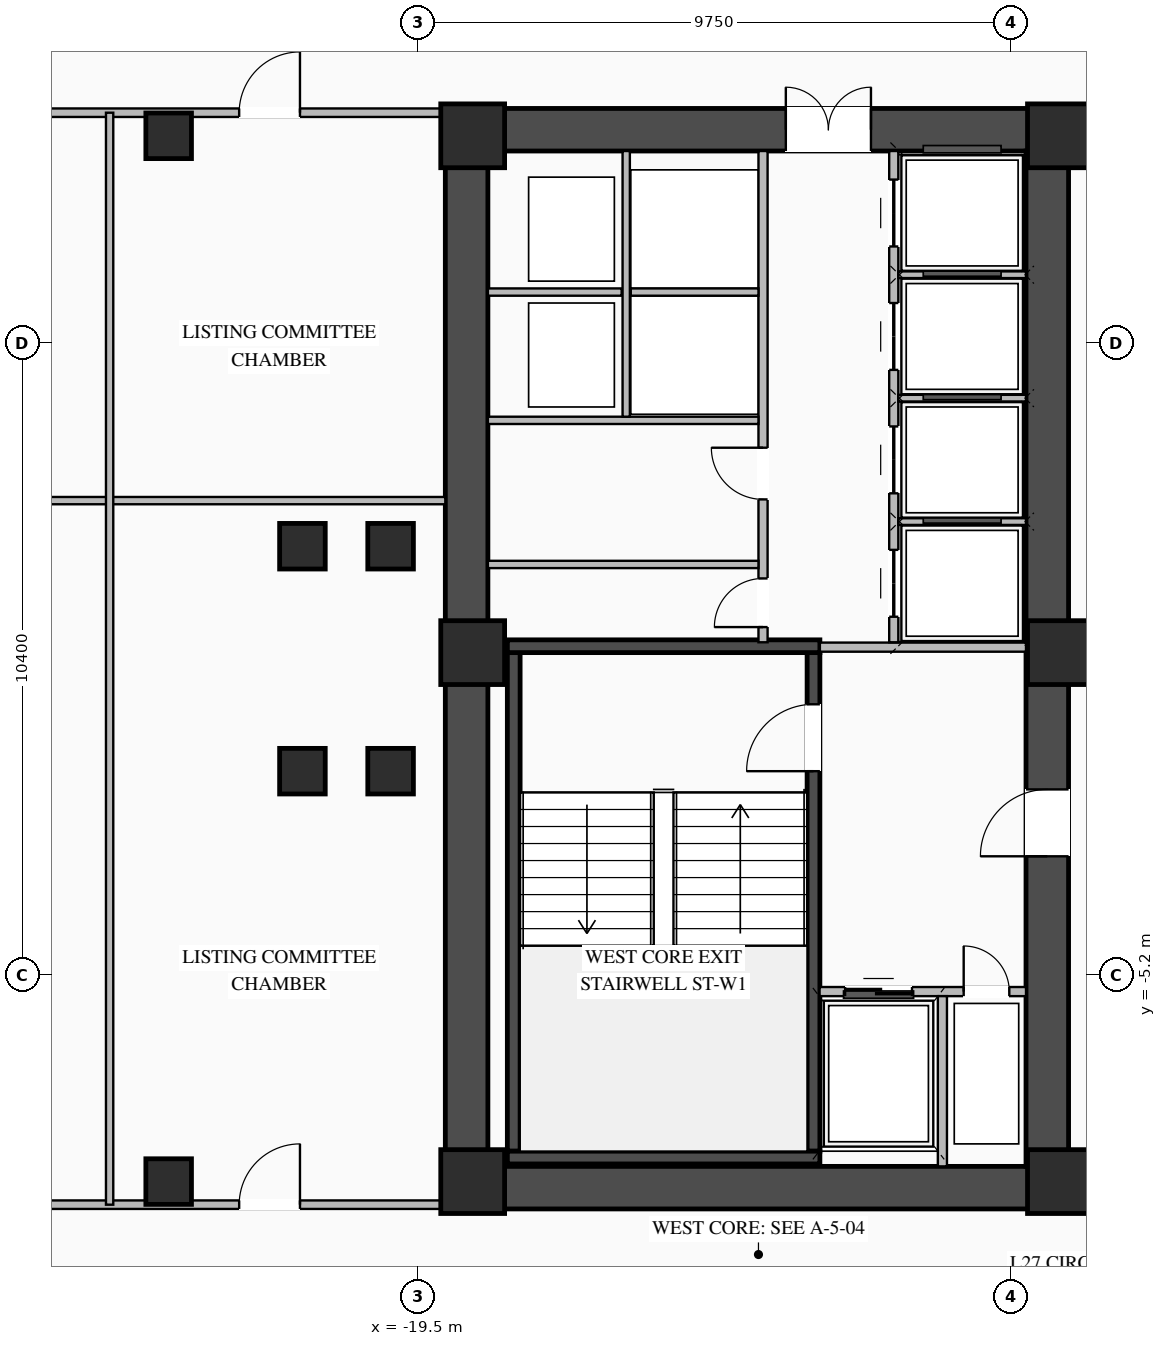
"""IFC4 building model, lengths in metres.
Left out: names, types, materials, properties, quantities, classifications, styles, units other than length and angle.
Written with IfcOpenShell. Run it as: python <this file> out.ifc"""

import sys

from ifc_helpers import new_model, si_unit, direction, frame, frame_2d, origin, origin_2d, place, context, subcontext, project, spatial, rectangle, i_section, extrude, element, fill, save


model = new_model("IFC4")
c1 = context("Model", 3, precision=1e-05, world=origin(), true_north=direction((0.0, 1.0)))
c2 = subcontext(c1, "Body", "Model", "MODEL_VIEW")
j1 = project(units=[si_unit("LENGTHUNIT", "METRE"), si_unit("PLANEANGLEUNIT", "RADIAN")], contexts=[c1])
p1 = place(None, origin())
s1 = spatial("IfcSite", under=j1, at=p1, CompositionType="ELEMENT")
p2 = place(p1, origin())
s2 = spatial("IfcBuilding", under=s1, at=p2, CompositionType="ELEMENT")
p3 = place(p2, frame((0.0, 0.0, 101.8)))
s3 = spatial("IfcBuildingStorey", under=s2, at=p3, CompositionType="ELEMENT", Elevation=101.8)
p4 = place(p3, frame((-19.05, -8.7, 0.0), z_axis=(0.0, 0.0, 1.0), x_axis=(1.0, 0.0, 0.0)))
e1 = element("IfcWall", 1, at=p4, inside=s3, PredefinedType="SHEAR", context=c2, shape_type="SweptSolid", body=[
    extrude(rectangle(XDim=10.25, YDim=0.7, at=frame_2d((5.125, 0.0))), origin(), (0.0, 0.0, 1.0), 3.27),
])
p5 = place(p3, frame((-19.05, 8.7, 0.0), z_axis=(0.0, 0.0, 1.0), x_axis=(1.0, 0.0, 0.0)))
e2 = element("IfcWall", 2, at=p5, inside=s3, PredefinedType="SHEAR", context=c2, shape_type="SweptSolid", body=[
    extrude(rectangle(XDim=10.25, YDim=0.7, at=frame_2d((5.125, 0.0))), origin(), (0.0, 0.0, 1.0), 3.27),
])
p6 = place(p5, frame((5.6, 0.0, 0.0)))
e3 = element("IfcOpeningElement", 3, at=p6, cuts=e2, PredefinedType="OPENING", context=c2, shape_type="SweptSolid", body=[
    extrude(rectangle(XDim=1.4, YDim=2.05, at=frame_2d((0.7, 1.025))), frame((0.0, 0.36, 0.0), z_axis=(0.0, -1.0, 0.0), x_axis=(1.0, 0.0, 0.0)), (0.0, 0.0, 1.0), 0.72),
])
p7 = place(p3, frame((-18.7, -8.35, 0.0), z_axis=(0.0, 0.0, 1.0), x_axis=(0.0, 1.0, 0.0)))
e4 = element("IfcWall", 4, at=p7, inside=s3, PredefinedType="SHEAR", context=c2, shape_type="SweptSolid", body=[
    extrude(rectangle(XDim=16.7, YDim=0.7, at=frame_2d((8.35, 0.0))), origin(), (0.0, 0.0, 1.0), 3.27),
])
p8 = place(p3, frame((-9.15, -8.35, 0.0), z_axis=(0.0, 0.0, 1.0), x_axis=(0.0, 1.0, 0.0)))
e5 = element("IfcWall", 5, at=p8, inside=s3, PredefinedType="SHEAR", context=c2, shape_type="SweptSolid", body=[
    extrude(rectangle(XDim=16.7, YDim=0.7, at=frame_2d((8.35, 0.0))), origin(), (0.0, 0.0, 1.0), 3.27),
])
p9 = place(p8, frame((5.1, 0.0, 0.0)))
e6 = element("IfcOpeningElement", 6, at=p9, cuts=e5, PredefinedType="OPENING", context=c2, shape_type="SweptSolid", body=[
    extrude(rectangle(XDim=1.1, YDim=2.08, at=frame_2d((0.55, 1.04))), frame((0.0, 0.36, 0.0), z_axis=(0.0, -1.0, 0.0), x_axis=(1.0, 0.0, 0.0)), (0.0, 0.0, 1.0), 0.72),
])
p10 = place(p3, frame((-12.995, -8.1, 0.0), z_axis=(0.0, 0.0, 1.0), x_axis=(0.0, 1.0, 0.0)))
e7 = element("IfcWall", 7, at=p10, inside=s3, PredefinedType="SHEAR", context=c2, shape_type="SweptSolid", body=[
    extrude(rectangle(XDim=8.2, YDim=0.21, at=frame_2d((4.1, 0.0))), origin(), (0.0, 0.0, 1.0), 3.27),
])
p11 = place(p10, frame((6.25, 0.0, 0.0)))
e8 = element("IfcOpeningElement", 8, at=p11, cuts=e7, PredefinedType="OPENING", context=c2, shape_type="SweptSolid", body=[
    extrude(rectangle(XDim=1.1, YDim=2.15, at=frame_2d((0.55, 1.075))), frame((0.0, 0.115, 0.0), z_axis=(0.0, -1.0, 0.0), x_axis=(1.0, 0.0, 0.0)), (0.0, 0.0, 1.0), 0.23),
])
p12 = place(p3, frame((-17.925, -8.1, 0.0), z_axis=(0.0, 0.0, 1.0), x_axis=(0.0, 1.0, 0.0)))
e9 = element("IfcWall", 9, at=p12, inside=s3, PredefinedType="SHEAR", context=c2, shape_type="SweptSolid", body=[
    extrude(rectangle(XDim=8.2, YDim=0.21, at=frame_2d((4.1, 0.0))), origin(), (0.0, 0.0, 1.0), 3.27),
])
for number, where, z_axis, x_axis in (
    (10, (-18.03, -8.205, 0.0), (0.0, 0.0, 1.0), (1.0, 0.0, 0.0)),
    (11, (-12.89, 0.205, 0.0), (0.0, 0.0, 1.0), (-1.0, 0.0, 0.0)),
):
    element("IfcWall", number, at=place(p3, frame(where, z_axis=z_axis, x_axis=x_axis)), inside=s3, PredefinedType="SHEAR", context=c2, shape_type="SweptSolid", body=[
        extrude(rectangle(XDim=5.14, YDim=0.21, at=frame_2d((2.57, 0.0))), origin(), (0.0, 0.0, 1.0), 3.27),
    ])
for number, where, z_axis, x_axis in (
    (12, (-8.95, -8.6, 0.0), (0.0, 0.0, 1.0), (1.0, 0.0, 0.0)),
    (13, (-8.95, 0.1, 0.0), (0.0, 0.0, 1.0), (1.0, 0.0, 0.0)),
    (14, (-8.95, 8.6, 0.0), (0.0, 0.0, 1.0), (1.0, 0.0, 0.0)),
    (15, (-18.6, -8.6, 0.0), (0.0, 0.0, 1.0), (1.0, 0.0, 0.0)),
    (16, (-18.6, 0.1, 0.0), (0.0, 0.0, 1.0), (1.0, 0.0, 0.0)),
    (17, (-18.6, 8.6, 0.0), (0.0, 0.0, 1.0), (1.0, 0.0, 0.0)),
):
    element("IfcColumn", number, at=place(p3, frame(where, z_axis=z_axis, x_axis=x_axis)), inside=s3, PredefinedType="COLUMN", context=c2, shape_type="SweptSolid", body=[
        extrude(rectangle(XDim=1.05, YDim=1.05, at=origin_2d()), origin(), (0.0, 0.0, 1.0), 3.45),
    ])
for number, where, z_axis, x_axis in (
    (18, (-21.4, -1.85, 0.0), (0.0, 0.0, 1.0), (1.0, 0.0, 0.0)),
    (19, (-21.4, 1.85, 0.0), (0.0, 0.0, 1.0), (1.0, 0.0, 0.0)),
    (20, (-19.95, -1.85, 0.0), (0.0, 0.0, 1.0), (1.0, 0.0, 0.0)),
    (21, (-19.95, 1.85, 0.0), (0.0, 0.0, 1.0), (1.0, 0.0, 0.0)),
    (22, (-23.6, -8.6, 0.0), (0.0, 0.0, 1.0), (1.0, 0.0, 0.0)),
    (23, (-23.6, 8.6, 0.0), (0.0, 0.0, 1.0), (1.0, 0.0, 0.0)),
):
    element("IfcColumn", number, at=place(p3, frame(where, z_axis=z_axis, x_axis=x_axis)), inside=s3, PredefinedType="COLUMN", context=c2, shape_type="SweptSolid", body=[
        extrude(i_section(OverallWidth=0.75, OverallDepth=0.75, WebThickness=0.03, FlangeThickness=0.044, at=origin_2d()), origin(), (0.0, 0.0, 1.0), 3.45),
    ])
p13 = place(p3, frame((-12.895, -5.475, 0.0), z_axis=(0.0, 0.0, 1.0), x_axis=(1.0, 0.0, 0.0)))
e24 = element("IfcWall", 24, at=p13, inside=s3, PredefinedType="STANDARD", context=c2, shape_type="SweptSolid", body=[
    extrude(rectangle(XDim=3.395, YDim=0.15, at=frame_2d((1.698, 0.0))), origin(), (0.0, 0.0, 1.0), 3.25),
])
p14 = place(p13, frame((0.42, 0.0, 0.0)))
e25 = element("IfcOpeningElement", 25, at=p14, cuts=e24, PredefinedType="OPENING", context=c2, shape_type="SweptSolid", body=[
    extrude(rectangle(XDim=1.1, YDim=2.15, at=frame_2d((0.55, 1.075))), frame((0.0, 0.085, 0.0), z_axis=(0.0, -1.0, 0.0), x_axis=(1.0, 0.0, 0.0)), (0.0, 0.0, 1.0), 0.17),
])
p15 = place(p13, frame((2.37, 0.0, 0.0)))
e26 = element("IfcOpeningElement", 26, at=p15, cuts=e24, PredefinedType="OPENING", context=c2, shape_type="SweptSolid", body=[
    extrude(rectangle(XDim=0.75, YDim=2.05, at=frame_2d((0.375, 1.025))), frame((0.0, 0.085, 0.0), z_axis=(0.0, -1.0, 0.0), x_axis=(1.0, 0.0, 0.0)), (0.0, 0.0, 1.0), 0.17),
])
p16 = place(p3, frame((-10.875, -8.35, 0.0), z_axis=(0.0, 0.0, 1.0), x_axis=(0.0, 1.0, 0.0)))
e27 = element("IfcWall", 27, at=p16, inside=s3, PredefinedType="STANDARD", context=c2, shape_type="SweptSolid", body=[
    extrude(rectangle(XDim=2.8, YDim=0.15, at=frame_2d((1.4, 0.0))), origin(), (0.0, 0.0, 1.0), 3.25),
])
p17 = place(p3, frame((-12.89, 0.19, 0.0), z_axis=(0.0, 0.0, 1.0), x_axis=(1.0, 0.0, 0.0)))
e28 = element("IfcWall", 28, at=p17, inside=s3, PredefinedType="STANDARD", context=c2, shape_type="SweptSolid", body=[
    extrude(rectangle(XDim=3.39, YDim=0.15, at=frame_2d((1.695, 0.0))), origin(), (0.0, 0.0, 1.0), 2.645),
])
p18 = place(p3, frame((-11.675, 0.27, 0.0), z_axis=(0.0, 0.0, 1.0), x_axis=(0.0, 1.0, 0.0)))
e29 = element("IfcWall", 29, at=p18, inside=s3, PredefinedType="STANDARD", context=c2, shape_type="SweptSolid", body=[
    extrude(rectangle(XDim=8.08, YDim=0.15, at=frame_2d((4.04, 0.0))), origin(), (0.0, 0.0, 1.0), 3.25),
])
p19 = place(p18, frame((0.42, 0.0, 0.0)))
e30 = element("IfcOpeningElement", 30, at=p19, cuts=e29, PredefinedType="OPENING", context=c2, shape_type="SweptSolid", body=[
    extrude(rectangle(XDim=1.1, YDim=2.1, at=frame_2d((0.55, 1.05))), frame((0.0, 0.085, 0.0), z_axis=(0.0, -1.0, 0.0), x_axis=(1.0, 0.0, 0.0)), (0.0, 0.0, 1.0), 0.17),
])
p20 = place(p18, frame((2.45, 0.0, 0.0)))
e31 = element("IfcOpeningElement", 31, at=p20, cuts=e29, PredefinedType="OPENING", context=c2, shape_type="SweptSolid", body=[
    extrude(rectangle(XDim=1.1, YDim=2.1, at=frame_2d((0.55, 1.05))), frame((0.0, 0.085, 0.0), z_axis=(0.0, -1.0, 0.0), x_axis=(1.0, 0.0, 0.0)), (0.0, 0.0, 1.0), 0.17),
])
p21 = place(p18, frame((4.48, 0.0, 0.0)))
e32 = element("IfcOpeningElement", 32, at=p21, cuts=e29, PredefinedType="OPENING", context=c2, shape_type="SweptSolid", body=[
    extrude(rectangle(XDim=1.1, YDim=2.1, at=frame_2d((0.55, 1.05))), frame((0.0, 0.085, 0.0), z_axis=(0.0, -1.0, 0.0), x_axis=(1.0, 0.0, 0.0)), (0.0, 0.0, 1.0), 0.17),
])
p22 = place(p18, frame((6.51, 0.0, 0.0)))
e33 = element("IfcOpeningElement", 33, at=p22, cuts=e29, PredefinedType="OPENING", context=c2, shape_type="SweptSolid", body=[
    extrude(rectangle(XDim=1.1, YDim=2.1, at=frame_2d((0.55, 1.05))), frame((0.0, 0.085, 0.0), z_axis=(0.0, -1.0, 0.0), x_axis=(1.0, 0.0, 0.0)), (0.0, 0.0, 1.0), 0.17),
])
for number, where, z_axis, x_axis in (
    (34, (-11.6, 2.255, 0.0), (0.0, 0.0, 1.0), (1.0, 0.0, 0.0)),
    (35, (-11.6, 4.285, 0.0), (0.0, 0.0, 1.0), (1.0, 0.0, 0.0)),
    (36, (-11.6, 6.315, 0.0), (0.0, 0.0, 1.0), (1.0, 0.0, 0.0)),
):
    element("IfcWall", number, at=place(p3, frame(where, z_axis=z_axis, x_axis=x_axis)), inside=s3, PredefinedType="STANDARD", context=c2, shape_type="SweptSolid", body=[
        extrude(rectangle(XDim=2.1, YDim=0.11, at=frame_2d((1.05, 0.0))), origin(), (0.0, 0.0, 1.0), 3.25),
    ])
p23 = place(p3, frame((-13.825, 0.27, 0.0), z_axis=(0.0, 0.0, 1.0), x_axis=(0.0, 1.0, 0.0)))
e37 = element("IfcWall", 37, at=p23, inside=s3, PredefinedType="STANDARD", context=c2, shape_type="SweptSolid", body=[
    extrude(rectangle(XDim=8.08, YDim=0.15, at=frame_2d((4.04, 0.0))), origin(), (0.0, 0.0, 1.0), 3.25),
])
p24 = place(p23, frame((0.25, 0.0, 0.0)))
e38 = element("IfcOpeningElement", 38, at=p24, cuts=e37, PredefinedType="OPENING", context=c2, shape_type="SweptSolid", body=[
    extrude(rectangle(XDim=0.8, YDim=2.05, at=frame_2d((0.4, 1.025))), frame((0.0, 0.085, 0.0), z_axis=(0.0, -1.0, 0.0), x_axis=(1.0, 0.0, 0.0)), (0.0, 0.0, 1.0), 0.17),
])
p25 = place(p23, frame((2.35, 0.0, 0.0)))
e39 = element("IfcOpeningElement", 39, at=p25, cuts=e37, PredefinedType="OPENING", context=c2, shape_type="SweptSolid", body=[
    extrude(rectangle(XDim=0.85, YDim=2.05, at=frame_2d((0.425, 1.025))), frame((0.0, 0.085, 0.0), z_axis=(0.0, -1.0, 0.0), x_axis=(1.0, 0.0, 0.0)), (0.0, 0.0, 1.0), 0.17),
])
p26 = place(p3, frame((-18.35, 3.92, 0.0), z_axis=(0.0, 0.0, 1.0), x_axis=(1.0, 0.0, 0.0)))
e40 = element("IfcWall", 40, at=p26, inside=s3, PredefinedType="STANDARD", context=c2, shape_type="SweptSolid", body=[
    extrude(rectangle(XDim=4.45, YDim=0.12, at=frame_2d((2.225, 0.0))), origin(), (0.0, 0.0, 1.0), 3.25),
])
p27 = place(p3, frame((-18.35, 6.03, 0.0), z_axis=(0.0, 0.0, 1.0), x_axis=(1.0, 0.0, 0.0)))
e41 = element("IfcWall", 41, at=p27, inside=s3, PredefinedType="STANDARD", context=c2, shape_type="SweptSolid", body=[
    extrude(rectangle(XDim=2.2, YDim=0.12, at=frame_2d((1.1, 0.0))), origin(), (0.0, 0.0, 1.0), 3.25),
])
p28 = place(p3, frame((-16.075, 3.98, 0.0), z_axis=(0.0, 0.0, 1.0), x_axis=(0.0, 1.0, 0.0)))
e42 = element("IfcWall", 42, at=p28, inside=s3, PredefinedType="STANDARD", context=c2, shape_type="SweptSolid", body=[
    extrude(rectangle(XDim=4.37, YDim=0.12, at=frame_2d((2.185, 0.0))), origin(), (0.0, 0.0, 1.0), 3.25),
])
p29 = place(p3, frame((-16.0, 6.03, 0.0), z_axis=(0.0, 0.0, 1.0), x_axis=(1.0, 0.0, 0.0)))
e43 = element("IfcWall", 43, at=p29, inside=s3, PredefinedType="STANDARD", context=c2, shape_type="SweptSolid", body=[
    extrude(rectangle(XDim=2.1, YDim=0.12, at=frame_2d((1.05, 0.0))), origin(), (0.0, 0.0, 1.0), 3.25),
])
p30 = place(p3, frame((-18.35, 1.55, 0.0), z_axis=(0.0, 0.0, 1.0), x_axis=(1.0, 0.0, 0.0)))
e44 = element("IfcWall", 44, at=p30, inside=s3, PredefinedType="STANDARD", context=c2, shape_type="SweptSolid", body=[
    extrude(rectangle(XDim=4.45, YDim=0.12, at=frame_2d((2.225, 0.0))), origin(), (0.0, 0.0, 1.0), 3.25),
])
p31 = place(p3, frame((-30.351, 8.98, 0.0), z_axis=(0.0, 0.0, 1.0), x_axis=(1.0, 0.0, 0.0)))
e45 = element("IfcWall", 45, at=p31, inside=s3, PredefinedType="STANDARD", context=c2, shape_type="SweptSolid", body=[
    extrude(rectangle(XDim=11.301, YDim=0.14, at=frame_2d((5.651, 0.0))), origin(), (0.0, 0.0, 1.0), 3.25),
])
p32 = place(p31, frame((2.834, 0.0, 0.0)))
e46 = element("IfcOpeningElement", 46, at=p32, cuts=e45, PredefinedType="OPENING", context=c2, shape_type="SweptSolid", body=[
    extrude(rectangle(XDim=1.0, YDim=2.08, at=frame_2d((0.5, 1.04))), frame((0.0, 0.08, 0.0), z_axis=(0.0, -1.0, 0.0), x_axis=(1.0, 0.0, 0.0)), (0.0, 0.0, 1.0), 0.16),
])
p33 = place(p31, frame((7.911, 0.0, 0.0)))
e47 = element("IfcOpeningElement", 47, at=p33, cuts=e45, PredefinedType="OPENING", context=c2, shape_type="SweptSolid", body=[
    extrude(rectangle(XDim=1.0, YDim=2.08, at=frame_2d((0.5, 1.04))), frame((0.0, 0.08, 0.0), z_axis=(0.0, -1.0, 0.0), x_axis=(1.0, 0.0, 0.0)), (0.0, 0.0, 1.0), 0.16),
])
p34 = place(p3, frame((-28.622, -8.98, 0.0), z_axis=(0.0, 0.0, 1.0), x_axis=(1.0, 0.0, 0.0)))
e48 = element("IfcWall", 48, at=p34, inside=s3, PredefinedType="STANDARD", context=c2, shape_type="SweptSolid", body=[
    extrude(rectangle(XDim=9.572, YDim=0.14, at=frame_2d((4.786, 0.0))), origin(), (0.0, 0.0, 1.0), 3.25),
])
p35 = place(p34, frame((1.656, 0.0, 0.0)))
e49 = element("IfcOpeningElement", 49, at=p35, cuts=e48, PredefinedType="OPENING", context=c2, shape_type="SweptSolid", body=[
    extrude(rectangle(XDim=1.0, YDim=2.08, at=frame_2d((0.5, 1.04))), frame((0.0, 0.08, 0.0), z_axis=(0.0, -1.0, 0.0), x_axis=(1.0, 0.0, 0.0)), (0.0, 0.0, 1.0), 0.16),
])
p36 = place(p34, frame((6.181, 0.0, 0.0)))
e50 = element("IfcOpeningElement", 50, at=p36, cuts=e48, PredefinedType="OPENING", context=c2, shape_type="SweptSolid", body=[
    extrude(rectangle(XDim=1.0, YDim=2.08, at=frame_2d((0.5, 1.04))), frame((0.0, 0.08, 0.0), z_axis=(0.0, -1.0, 0.0), x_axis=(1.0, 0.0, 0.0)), (0.0, 0.0, 1.0), 0.16),
])
p37 = place(p3, frame((-29.737, 2.6, 0.0), z_axis=(0.0, 0.0, 1.0), x_axis=(1.0, 0.0, 0.0)))
e51 = element("IfcWall", 51, at=p37, inside=s3, PredefinedType="STANDARD", context=c2, shape_type="SweptSolid", body=[
    extrude(rectangle(XDim=10.687, YDim=0.12, at=frame_2d((5.344, 0.0))), origin(), (0.0, 0.0, 1.0), 3.25),
])
p38 = place(p3, frame((-24.571, -8.98, 0.0), z_axis=(0.0, 0.0, 1.0), x_axis=(0.0, 1.0, 0.0)))
e52 = element("IfcWall", 52, at=p38, inside=s3, PredefinedType="STANDARD", context=c2, shape_type="SweptSolid", body=[
    extrude(rectangle(XDim=17.96, YDim=0.12, at=frame_2d((8.98, 0.0))), origin(), (0.0, 0.0, 1.0), 3.25),
])
p39 = place(p11, origin())
e53 = element("IfcDoor", 53, at=p39, inside=s3, OperationType="SINGLE_SWING_LEFT", PredefinedType="DOOR", context=c2, shape_type="SweptSolid", body=[
    extrude(rectangle(XDim=1.1, YDim=2.15, at=frame_2d((0.55, 1.075))), frame((0.0, 0.025, 0.0), z_axis=(0.0, -1.0, 0.0), x_axis=(1.0, 0.0, 0.0)), (0.0, 0.0, 1.0), 0.05),
])
fill(e8, e53)
p40 = place(p14, origin())
e54 = element("IfcDoor", 54, at=p40, inside=s3, OperationType="DOUBLE_DOOR_SLIDING", PredefinedType="DOOR", context=c2, shape_type="SweptSolid", body=[
    extrude(rectangle(XDim=1.1, YDim=2.15, at=frame_2d((0.55, 1.075))), frame((0.0, 0.025, 0.0), z_axis=(0.0, -1.0, 0.0), x_axis=(1.0, 0.0, 0.0)), (0.0, 0.0, 1.0), 0.05),
])
fill(e25, e54)
p41 = place(p15, origin())
e55 = element("IfcDoor", 55, at=p41, inside=s3, OperationType="SINGLE_SWING_LEFT", PredefinedType="DOOR", context=c2, shape_type="SweptSolid", body=[
    extrude(rectangle(XDim=0.75, YDim=2.05, at=frame_2d((0.375, 1.025))), frame((0.0, 0.025, 0.0), z_axis=(0.0, -1.0, 0.0), x_axis=(1.0, 0.0, 0.0)), (0.0, 0.0, 1.0), 0.05),
])
fill(e26, e55)
p42 = place(p9, origin())
e56 = element("IfcDoor", 56, at=p42, inside=s3, OperationType="SINGLE_SWING_LEFT", PredefinedType="DOOR", context=c2, shape_type="SweptSolid", body=[
    extrude(rectangle(XDim=1.1, YDim=2.08, at=frame_2d((0.55, 1.04))), frame((0.0, 0.305, 0.0), z_axis=(0.0, -1.0, 0.0), x_axis=(1.0, 0.0, 0.0)), (0.0, 0.0, 1.0), 0.05),
])
fill(e6, e56)
p43 = place(p6, origin())
e57 = element("IfcDoor", 57, at=p43, inside=s3, OperationType="DOUBLE_DOOR_SINGLE_SWING", PredefinedType="DOOR", context=c2, shape_type="SweptSolid", body=[
    extrude(rectangle(XDim=1.4, YDim=2.05, at=frame_2d((0.7, 1.025))), frame((0.0, 0.295, 0.0), z_axis=(0.0, -1.0, 0.0), x_axis=(1.0, 0.0, 0.0)), (0.0, 0.0, 1.0), 0.05),
])
fill(e3, e57)
p44 = place(p19, origin())
e58 = element("IfcDoor", 58, at=p44, inside=s3, OperationType="DOUBLE_DOOR_SLIDING", PredefinedType="DOOR", context=c2, shape_type="SweptSolid", body=[
    extrude(rectangle(XDim=1.1, YDim=2.1, at=frame_2d((0.55, 1.05))), frame((0.0, 0.025, 0.0), z_axis=(0.0, -1.0, 0.0), x_axis=(1.0, 0.0, 0.0)), (0.0, 0.0, 1.0), 0.05),
])
fill(e30, e58)
p45 = place(p20, origin())
e59 = element("IfcDoor", 59, at=p45, inside=s3, OperationType="DOUBLE_DOOR_SLIDING", PredefinedType="DOOR", context=c2, shape_type="SweptSolid", body=[
    extrude(rectangle(XDim=1.1, YDim=2.1, at=frame_2d((0.55, 1.05))), frame((0.0, 0.025, 0.0), z_axis=(0.0, -1.0, 0.0), x_axis=(1.0, 0.0, 0.0)), (0.0, 0.0, 1.0), 0.05),
])
fill(e31, e59)
p46 = place(p21, origin())
e60 = element("IfcDoor", 60, at=p46, inside=s3, OperationType="DOUBLE_DOOR_SLIDING", PredefinedType="DOOR", context=c2, shape_type="SweptSolid", body=[
    extrude(rectangle(XDim=1.1, YDim=2.1, at=frame_2d((0.55, 1.05))), frame((0.0, 0.025, 0.0), z_axis=(0.0, -1.0, 0.0), x_axis=(1.0, 0.0, 0.0)), (0.0, 0.0, 1.0), 0.05),
])
fill(e32, e60)
p47 = place(p22, origin())
e61 = element("IfcDoor", 61, at=p47, inside=s3, OperationType="DOUBLE_DOOR_SLIDING", PredefinedType="DOOR", context=c2, shape_type="SweptSolid", body=[
    extrude(rectangle(XDim=1.1, YDim=2.1, at=frame_2d((0.55, 1.05))), frame((0.0, 0.025, 0.0), z_axis=(0.0, -1.0, 0.0), x_axis=(1.0, 0.0, 0.0)), (0.0, 0.0, 1.0), 0.05),
])
fill(e33, e61)
p48 = place(p24, origin())
e62 = element("IfcDoor", 62, at=p48, inside=s3, OperationType="SINGLE_SWING_LEFT", PredefinedType="DOOR", context=c2, shape_type="SweptSolid", body=[
    extrude(rectangle(XDim=0.8, YDim=2.05, at=frame_2d((0.4, 1.025))), frame((0.0, 0.025, 0.0), z_axis=(0.0, -1.0, 0.0), x_axis=(1.0, 0.0, 0.0)), (0.0, 0.0, 1.0), 0.05),
])
fill(e38, e62)
p49 = place(p25, origin())
e63 = element("IfcDoor", 63, at=p49, inside=s3, OperationType="SINGLE_SWING_RIGHT", PredefinedType="DOOR", context=c2, shape_type="SweptSolid", body=[
    extrude(rectangle(XDim=0.85, YDim=2.05, at=frame_2d((0.425, 1.025))), frame((0.0, 0.025, 0.0), z_axis=(0.0, -1.0, 0.0), x_axis=(1.0, 0.0, 0.0)), (0.0, 0.0, 1.0), 0.05),
])
fill(e39, e63)
p50 = place(p33, origin())
e64 = element("IfcDoor", 64, at=p50, inside=s3, OperationType="SINGLE_SWING_RIGHT", PredefinedType="DOOR", context=c2, shape_type="SweptSolid", body=[
    extrude(rectangle(XDim=1.0, YDim=2.08, at=frame_2d((0.5, 1.04))), frame((0.0, 0.025, 0.0), z_axis=(0.0, -1.0, 0.0), x_axis=(1.0, 0.0, 0.0)), (0.0, 0.0, 1.0), 0.05),
])
fill(e47, e64)
p51 = place(p36, origin())
e65 = element("IfcDoor", 65, at=p51, inside=s3, OperationType="SINGLE_SWING_RIGHT", PredefinedType="DOOR", context=c2, shape_type="SweptSolid", body=[
    extrude(rectangle(XDim=1.0, YDim=2.08, at=frame_2d((0.5, 1.04))), frame((0.0, 0.025, 0.0), z_axis=(0.0, -1.0, 0.0), x_axis=(1.0, 0.0, 0.0)), (0.0, 0.0, 1.0), 0.05),
])
fill(e50, e65)
save(model, sys.argv[1])
